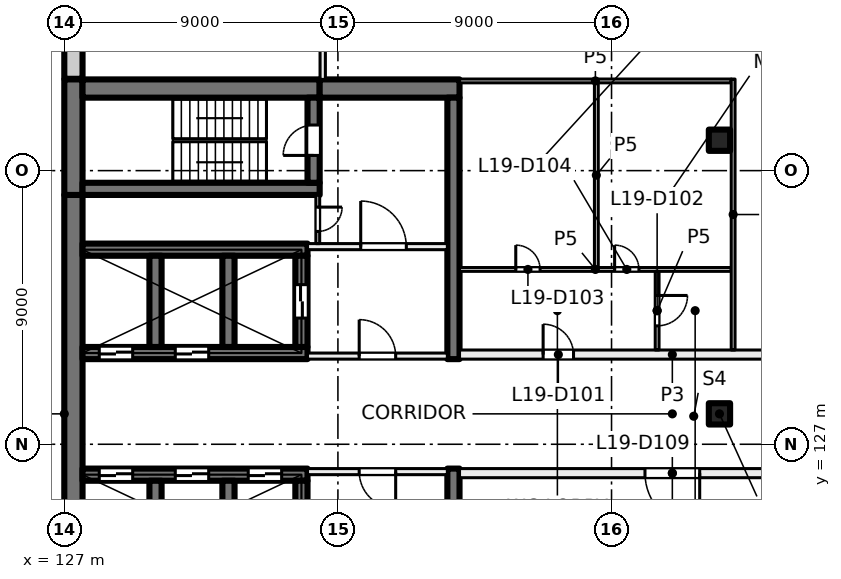
"""IFC4 building model, lengths in metres.
Left out: names, types, materials, properties, quantities, classifications, styles, units other than length and angle.
Written with IfcOpenShell. Run it as: python <this file> out.ifc"""

import sys

from ifc_helpers import new_model, si_unit, direction, frame, frame_2d, origin, origin_2d, place, context, subcontext, project, spatial, rectangle, extrude, element, fill, save


model = new_model("IFC4")
c1 = context("Model", 3, precision=1e-05, world=origin(), true_north=direction((0.0, 1.0)))
c2 = subcontext(c1, "Body", "Model", "MODEL_VIEW")
j1 = project(units=[si_unit("LENGTHUNIT", "METRE"), si_unit("PLANEANGLEUNIT", "RADIAN")], contexts=[c1])
p1 = place(None, origin())
s1 = spatial("IfcSite", under=j1, at=p1, CompositionType="ELEMENT")
p2 = place(p1, origin())
s2 = spatial("IfcBuilding", under=s1, at=p2, CompositionType="ELEMENT")
p3 = place(p2, frame((0.0, 0.0, 85.0)))
s3 = spatial("IfcBuildingStorey", under=s2, at=p3, CompositionType="ELEMENT", Elevation=85.0)
for number, where, z_axis, x_axis in (
    (1, (148.55, 128.0, 0.0), (0.0, 0.0, 1.0), (1.0, 0.0, 0.0)),
    (2, (148.55, 137.0, 0.0), (0.0, 0.0, 1.0), (1.0, 0.0, 0.0)),
):
    element("IfcColumn", number, at=place(p3, frame(where, z_axis=z_axis, x_axis=x_axis)), inside=s3, PredefinedType="COLUMN", context=c2, shape_type="SweptSolid", body=[
        extrude(rectangle(XDim=0.7, YDim=0.7, at=origin_2d()), origin(), (0.0, 0.0, 1.0), 4.0),
    ])
p4 = place(p3, frame((127.3, 120.8, 0.0), z_axis=(0.0, 0.0, 1.0), x_axis=(0.0, 1.0, 0.0)))
e3 = element("IfcWall", 3, at=p4, inside=s3, PredefinedType="SHEAR", context=c2, shape_type="SweptSolid", body=[
    extrude(rectangle(XDim=14.4, YDim=0.6, at=frame_2d((7.2, 0.0))), origin(), (0.0, 0.0, 1.0), 4.0),
])
p5 = place(p3, frame((127.3, 135.2, 0.0), z_axis=(0.0, 0.0, 1.0), x_axis=(0.0, 1.0, 0.0)))
e4 = element("IfcWall", 4, at=p5, inside=s3, PredefinedType="SHEAR", context=c2, shape_type="SweptSolid", body=[
    extrude(rectangle(XDim=3.8, YDim=0.6, at=frame_2d((1.9, 0.0))), origin(), (0.0, 0.0, 1.0), 4.0),
])
p6 = place(p3, frame((127.6, 138.7, 0.0), z_axis=(0.0, 0.0, 1.0), x_axis=(1.0, 0.0, 0.0)))
e5 = element("IfcWall", 5, at=p6, inside=s3, PredefinedType="SHEAR", context=c2, shape_type="SweptSolid", body=[
    extrude(rectangle(XDim=7.8, YDim=0.6, at=frame_2d((3.9, 0.0))), origin(), (0.0, 0.0, 1.0), 4.0),
])
p7 = place(p3, frame((135.4, 138.7, 0.0), z_axis=(0.0, 0.0, 1.0), x_axis=(1.0, 0.0, 0.0)))
e6 = element("IfcWall", 6, at=p7, inside=s3, PredefinedType="SHEAR", context=c2, shape_type="SweptSolid", body=[
    extrude(rectangle(XDim=4.6, YDim=0.6, at=frame_2d((2.3, 0.0))), origin(), (0.0, 0.0, 1.0), 4.0),
])
p8 = place(p3, frame((127.6, 135.4, 0.0), z_axis=(0.0, 0.0, 1.0), x_axis=(1.0, 0.0, 0.0)))
e7 = element("IfcWall", 7, at=p8, inside=s3, PredefinedType="SHEAR", context=c2, shape_type="SweptSolid", body=[
    extrude(rectangle(XDim=7.8, YDim=0.4, at=frame_2d((3.9, 0.0))), origin(), (0.0, 0.0, 1.0), 4.0),
])
p9 = place(p3, frame((135.2, 135.6, 0.0), z_axis=(0.0, 0.0, 1.0), x_axis=(0.0, 1.0, 0.0)))
e8 = element("IfcWall", 8, at=p9, inside=s3, PredefinedType="SHEAR", context=c2, shape_type="SweptSolid", body=[
    extrude(rectangle(XDim=2.8, YDim=0.4, at=frame_2d((1.4, 0.0))), origin(), (0.0, 0.0, 1.0), 4.0),
])
p10 = place(p9, frame((0.9, 0.0, 0.0)))
e9 = element("IfcOpeningElement", 9, at=p10, cuts=e8, PredefinedType="OPENING", context=c2, shape_type="SweptSolid", body=[
    extrude(rectangle(XDim=1.0, YDim=2.1, at=frame_2d((0.5, 1.05))), frame((0.0, 0.21, 0.0), z_axis=(0.0, -1.0, 0.0), x_axis=(1.0, 0.0, 0.0)), (0.0, 0.0, 1.0), 0.42),
])
p11 = place(p3, frame((127.6, 126.0, 0.0), z_axis=(0.0, 0.0, 1.0), x_axis=(1.0, 0.0, 0.0)))
e10 = element("IfcWall", 10, at=p11, inside=s3, PredefinedType="SHEAR", context=c2, shape_type="SweptSolid", body=[
    extrude(rectangle(XDim=7.4, YDim=0.4, at=frame_2d((3.7, 0.0))), origin(), (0.0, 0.0, 1.0), 4.0),
])
p12 = place(p11, frame((0.55, 0.0, 0.0)))
e11 = element("IfcOpeningElement", 11, at=p12, cuts=e10, PredefinedType="OPENING", context=c2, shape_type="SweptSolid", body=[
    extrude(rectangle(XDim=1.1, YDim=2.1, at=frame_2d((0.55, 1.05))), frame((0.0, 0.21, 0.0), z_axis=(0.0, -1.0, 0.0), x_axis=(1.0, 0.0, 0.0)), (0.0, 0.0, 1.0), 0.42),
])
p13 = place(p11, frame((3.05, 0.0, 0.0)))
e12 = element("IfcOpeningElement", 12, at=p13, cuts=e10, PredefinedType="OPENING", context=c2, shape_type="SweptSolid", body=[
    extrude(rectangle(XDim=1.1, YDim=2.1, at=frame_2d((0.55, 1.05))), frame((0.0, 0.21, 0.0), z_axis=(0.0, -1.0, 0.0), x_axis=(1.0, 0.0, 0.0)), (0.0, 0.0, 1.0), 0.42),
])
p14 = place(p11, frame((5.45, 0.0, 0.0)))
e13 = element("IfcOpeningElement", 13, at=p14, cuts=e10, PredefinedType="OPENING", context=c2, shape_type="SweptSolid", body=[
    extrude(rectangle(XDim=1.1, YDim=2.1, at=frame_2d((0.55, 1.05))), frame((0.0, 0.21, 0.0), z_axis=(0.0, -1.0, 0.0), x_axis=(1.0, 0.0, 0.0)), (0.0, 0.0, 1.0), 0.42),
])
for number, where, z_axis, x_axis in (
    (14, (130.0, 122.8, 0.0), (0.0, 0.0, 1.0), (0.0, 1.0, 0.0)),
    (15, (132.4, 122.8, 0.0), (0.0, 0.0, 1.0), (0.0, 1.0, 0.0)),
    (16, (134.8, 122.8, 0.0), (0.0, 0.0, 1.0), (0.0, 1.0, 0.0)),
):
    element("IfcWall", number, at=place(p3, frame(where, z_axis=z_axis, x_axis=x_axis)), inside=s3, PredefinedType="SHEAR", context=c2, shape_type="SweptSolid", body=[
        extrude(rectangle(XDim=3.0, YDim=0.4, at=frame_2d((1.5, 0.0))), origin(), (0.0, 0.0, 1.0), 4.0),
    ])
p15 = place(p3, frame((127.6, 130.0, 0.0), z_axis=(0.0, 0.0, 1.0), x_axis=(1.0, 0.0, 0.0)))
e17 = element("IfcWall", 17, at=p15, inside=s3, PredefinedType="SHEAR", context=c2, shape_type="SweptSolid", body=[
    extrude(rectangle(XDim=7.4, YDim=0.4, at=frame_2d((3.7, 0.0))), origin(), (0.0, 0.0, 1.0), 4.0),
])
p16 = place(p15, frame((0.55, 0.0, 0.0)))
e18 = element("IfcOpeningElement", 18, at=p16, cuts=e17, PredefinedType="OPENING", context=c2, shape_type="SweptSolid", body=[
    extrude(rectangle(XDim=1.1, YDim=2.1, at=frame_2d((0.55, 1.05))), frame((0.0, 0.21, 0.0), z_axis=(0.0, -1.0, 0.0), x_axis=(1.0, 0.0, 0.0)), (0.0, 0.0, 1.0), 0.42),
])
p17 = place(p15, frame((3.05, 0.0, 0.0)))
e19 = element("IfcOpeningElement", 19, at=p17, cuts=e17, PredefinedType="OPENING", context=c2, shape_type="SweptSolid", body=[
    extrude(rectangle(XDim=1.1, YDim=2.1, at=frame_2d((0.55, 1.05))), frame((0.0, 0.21, 0.0), z_axis=(0.0, -1.0, 0.0), x_axis=(1.0, 0.0, 0.0)), (0.0, 0.0, 1.0), 0.42),
])
p18 = place(p3, frame((127.6, 133.4, 0.0), z_axis=(0.0, 0.0, 1.0), x_axis=(1.0, 0.0, 0.0)))
e20 = element("IfcWall", 20, at=p18, inside=s3, PredefinedType="SHEAR", context=c2, shape_type="SweptSolid", body=[
    extrude(rectangle(XDim=7.4, YDim=0.4, at=frame_2d((3.7, 0.0))), origin(), (0.0, 0.0, 1.0), 4.0),
])
for number, where, z_axis, x_axis in (
    (21, (130.0, 130.2, 0.0), (0.0, 0.0, 1.0), (0.0, 1.0, 0.0)),
    (22, (132.4, 130.2, 0.0), (0.0, 0.0, 1.0), (0.0, 1.0, 0.0)),
):
    element("IfcWall", number, at=place(p3, frame(where, z_axis=z_axis, x_axis=x_axis)), inside=s3, PredefinedType="SHEAR", context=c2, shape_type="SweptSolid", body=[
        extrude(rectangle(XDim=3.0, YDim=0.4, at=frame_2d((1.5, 0.0))), origin(), (0.0, 0.0, 1.0), 4.0),
    ])
p19 = place(p3, frame((134.8, 130.2, 0.0), z_axis=(0.0, 0.0, 1.0), x_axis=(0.0, 1.0, 0.0)))
e23 = element("IfcWall", 23, at=p19, inside=s3, PredefinedType="SHEAR", context=c2, shape_type="SweptSolid", body=[
    extrude(rectangle(XDim=3.0, YDim=0.4, at=frame_2d((1.5, 0.0))), origin(), (0.0, 0.0, 1.0), 4.0),
])
p20 = place(p19, frame((0.95, 0.0, 0.0)))
e24 = element("IfcOpeningElement", 24, at=p20, cuts=e23, PredefinedType="OPENING", context=c2, shape_type="SweptSolid", body=[
    extrude(rectangle(XDim=1.1, YDim=2.1, at=frame_2d((0.55, 1.05))), frame((0.0, 0.21, 0.0), z_axis=(0.0, -1.0, 0.0), x_axis=(1.0, 0.0, 0.0)), (0.0, 0.0, 1.0), 0.42),
])
for number, where, z_axis, x_axis in (
    (25, (139.8, 117.6, 0.0), (0.0, 0.0, 1.0), (0.0, 1.0, 0.0)),
    (26, (139.8, 129.8, 0.0), (0.0, 0.0, 1.0), (0.0, 1.0, 0.0)),
):
    element("IfcWall", number, at=place(p3, frame(where, z_axis=z_axis, x_axis=x_axis)), inside=s3, PredefinedType="SHEAR", context=c2, shape_type="SweptSolid", body=[
        extrude(rectangle(XDim=8.6, YDim=0.4, at=frame_2d((4.3, 0.0))), origin(), (0.0, 0.0, 1.0), 4.0),
    ])
p21 = place(p3, frame((127.3, 139.02, 0.0), z_axis=(0.0, 0.0, 1.0), x_axis=(0.0, 1.0, 0.0)))
e27 = element("IfcWall", 27, at=p21, inside=s3, PredefinedType="SOLIDWALL", context=c2, shape_type="SweptSolid", body=[
    extrude(rectangle(XDim=2.98, YDim=0.6, at=frame_2d((1.49, 0.0))), origin(), (0.0, 0.0, 1.0), 3.625),
])
p22 = place(p3, frame((135.0, 129.9, 0.0), z_axis=(0.0, 0.0, 1.0), x_axis=(1.0, 0.0, 0.0)))
e28 = element("IfcWall", 28, at=p22, inside=s3, PredefinedType="PARTITIONING", context=c2, shape_type="SweptSolid", body=[
    extrude(rectangle(XDim=4.6, YDim=0.2, at=frame_2d((2.3, 0.0))), origin(), (0.0, 0.0, 1.0), 3.625),
])
p23 = place(p22, frame((1.7, 0.0, 0.0)))
e29 = element("IfcOpeningElement", 29, at=p23, cuts=e28, PredefinedType="OPENING", context=c2, shape_type="SweptSolid", body=[
    extrude(rectangle(XDim=1.2, YDim=2.1, at=frame_2d((0.6, 1.05))), frame((0.0, 0.11, 0.0), z_axis=(0.0, -1.0, 0.0), x_axis=(1.0, 0.0, 0.0)), (0.0, 0.0, 1.0), 0.22),
])
p24 = place(p3, frame((135.0, 133.5, 0.0), z_axis=(0.0, 0.0, 1.0), x_axis=(1.0, 0.0, 0.0)))
e30 = element("IfcWall", 30, at=p24, inside=s3, PredefinedType="PARTITIONING", context=c2, shape_type="SweptSolid", body=[
    extrude(rectangle(XDim=4.6, YDim=0.2, at=frame_2d((2.3, 0.0))), origin(), (0.0, 0.0, 1.0), 3.625),
])
p25 = place(p24, frame((1.75, 0.0, 0.0)))
e31 = element("IfcOpeningElement", 31, at=p25, cuts=e30, PredefinedType="OPENING", context=c2, shape_type="SweptSolid", body=[
    extrude(rectangle(XDim=1.5, YDim=2.1, at=frame_2d((0.75, 1.05))), frame((0.0, 0.11, 0.0), z_axis=(0.0, -1.0, 0.0), x_axis=(1.0, 0.0, 0.0)), (0.0, 0.0, 1.0), 0.22),
])
p26 = place(p3, frame((135.337, 135.2, 0.0), z_axis=(0.0, 0.0, 1.0), x_axis=(0.0, -1.0, 0.0)))
e32 = element("IfcWall", 32, at=p26, inside=s3, PredefinedType="PARTITIONING", context=c2, shape_type="SweptSolid", body=[
    extrude(rectangle(XDim=1.6, YDim=0.125, at=frame_2d((0.8, 0.0))), origin(), (0.0, 0.0, 1.0), 3.625),
])
p27 = place(p26, frame((0.4, 0.0, 0.0)))
e33 = element("IfcOpeningElement", 33, at=p27, cuts=e32, PredefinedType="OPENING", context=c2, shape_type="SweptSolid", body=[
    extrude(rectangle(XDim=0.8, YDim=2.1, at=frame_2d((0.4, 1.05))), frame((0.0, 0.073, 0.0), z_axis=(0.0, -1.0, 0.0), x_axis=(1.0, 0.0, 0.0)), (0.0, 0.0, 1.0), 0.145),
])
p28 = place(p3, frame((139.6, 126.1, 0.0), z_axis=(0.0, 0.0, 1.0), x_axis=(-1.0, 0.0, 0.0)))
e34 = element("IfcWall", 34, at=p28, inside=s3, PredefinedType="PARTITIONING", context=c2, shape_type="SweptSolid", body=[
    extrude(rectangle(XDim=4.6, YDim=0.2, at=frame_2d((2.3, 0.0))), origin(), (0.0, 0.0, 1.0), 3.625),
])
p29 = place(p28, frame((1.7, 0.0, 0.0)))
e35 = element("IfcOpeningElement", 35, at=p29, cuts=e34, PredefinedType="OPENING", context=c2, shape_type="SweptSolid", body=[
    extrude(rectangle(XDim=1.2, YDim=2.1, at=frame_2d((0.6, 1.05))), frame((0.0, 0.11, 0.0), z_axis=(0.0, -1.0, 0.0), x_axis=(1.0, 0.0, 0.0)), (0.0, 0.0, 1.0), 0.22),
])
p30 = place(p3, frame((135.5, 145.4, 0.0), z_axis=(0.0, 0.0, 1.0), x_axis=(0.0, -1.0, 0.0)))
e36 = element("IfcWall", 36, at=p30, inside=s3, PredefinedType="PARTITIONING", context=c2, shape_type="SweptSolid", body=[
    extrude(rectangle(XDim=6.4, YDim=0.175, at=frame_2d((3.2, 0.0))), origin(), (0.0, 0.0, 1.0), 3.625),
])
p31 = place(p30, frame((2.6, 0.0, 0.0)))
e37 = element("IfcOpeningElement", 37, at=p31, cuts=e36, PredefinedType="OPENING", context=c2, shape_type="SweptSolid", body=[
    extrude(rectangle(XDim=1.2, YDim=2.1, at=frame_2d((0.6, 1.05))), frame((0.0, 0.097, 0.0), z_axis=(0.0, -1.0, 0.0), x_axis=(1.0, 0.0, 0.0)), (0.0, 0.0, 1.0), 0.195),
])
p32 = place(p3, frame((140.0, 129.95, 0.0), z_axis=(0.0, 0.0, 1.0), x_axis=(1.0, 0.0, 0.0)))
e38 = element("IfcWall", 38, at=p32, inside=s3, PredefinedType="PARTITIONING", context=c2, shape_type="SweptSolid", body=[
    extrude(rectangle(XDim=14.0, YDim=0.3, at=frame_2d((7.0, 0.0))), origin(), (0.0, 0.0, 1.0), 3.625),
])
p33 = place(p32, frame((2.75, 0.0, 0.0)))
e39 = element("IfcOpeningElement", 39, at=p33, cuts=e38, PredefinedType="OPENING", context=c2, shape_type="SweptSolid", body=[
    extrude(rectangle(XDim=1.0, YDim=2.1, at=frame_2d((0.5, 1.05))), frame((0.0, 0.16, 0.0), z_axis=(0.0, -1.0, 0.0), x_axis=(1.0, 0.0, 0.0)), (0.0, 0.0, 1.0), 0.32),
])
p34 = place(p32, frame((10.6, 0.0, 0.0)))
e40 = element("IfcOpeningElement", 40, at=p34, cuts=e38, PredefinedType="OPENING", context=c2, shape_type="SweptSolid", body=[
    extrude(rectangle(XDim=1.8, YDim=2.1, at=frame_2d((0.9, 1.05))), frame((0.0, 0.16, 0.0), z_axis=(0.0, -1.0, 0.0), x_axis=(1.0, 0.0, 0.0)), (0.0, 0.0, 1.0), 0.32),
])
p35 = place(p3, frame((140.0, 132.75, 0.0), z_axis=(0.0, 0.0, 1.0), x_axis=(1.0, 0.0, 0.0)))
e41 = element("IfcWall", 41, at=p35, inside=s3, PredefinedType="PARTITIONING", context=c2, shape_type="SweptSolid", body=[
    extrude(rectangle(XDim=8.938, YDim=0.125, at=frame_2d((4.469, 0.0))), origin(), (0.0, 0.0, 1.0), 3.625),
])
p36 = place(p35, frame((1.85, 0.0, 0.0)))
e42 = element("IfcOpeningElement", 42, at=p36, cuts=e41, PredefinedType="OPENING", context=c2, shape_type="SweptSolid", body=[
    extrude(rectangle(XDim=0.8, YDim=2.1, at=frame_2d((0.4, 1.05))), frame((0.0, 0.073, 0.0), z_axis=(0.0, -1.0, 0.0), x_axis=(1.0, 0.0, 0.0)), (0.0, 0.0, 1.0), 0.145),
])
p37 = place(p35, frame((5.102, 0.0, 0.0)))
e43 = element("IfcOpeningElement", 43, at=p37, cuts=e41, PredefinedType="OPENING", context=c2, shape_type="SweptSolid", body=[
    extrude(rectangle(XDim=0.8, YDim=2.1, at=frame_2d((0.4, 1.05))), frame((0.0, 0.073, 0.0), z_axis=(0.0, -1.0, 0.0), x_axis=(1.0, 0.0, 0.0)), (0.0, 0.0, 1.0), 0.145),
])
p38 = place(p3, frame((140.0, 138.95, 0.0), z_axis=(0.0, 0.0, 1.0), x_axis=(1.0, 0.0, 0.0)))
e44 = element("IfcWall", 44, at=p38, inside=s3, PredefinedType="PARTITIONING", context=c2, shape_type="SweptSolid", body=[
    extrude(rectangle(XDim=8.938, YDim=0.125, at=frame_2d((4.469, 0.0))), origin(), (0.0, 0.0, 1.0), 3.625),
])
p39 = place(p3, frame((144.5, 132.812, 0.0), z_axis=(0.0, 0.0, 1.0), x_axis=(0.0, 1.0, 0.0)))
e45 = element("IfcWall", 45, at=p39, inside=s3, PredefinedType="PARTITIONING", context=c2, shape_type="SweptSolid", body=[
    extrude(rectangle(XDim=6.076, YDim=0.125, at=frame_2d((3.038, 0.0))), origin(), (0.0, 0.0, 1.0), 3.625),
])
p40 = place(p3, frame((146.5, 132.688, 0.0), z_axis=(0.0, 0.0, 1.0), x_axis=(0.0, -1.0, 0.0)))
e46 = element("IfcWall", 46, at=p40, inside=s3, PredefinedType="PARTITIONING", context=c2, shape_type="SweptSolid", body=[
    extrude(rectangle(XDim=2.588, YDim=0.125, at=frame_2d((1.294, 0.0))), origin(), (0.0, 0.0, 1.0), 3.625),
])
p41 = place(p40, frame((0.794, 0.0, 0.0)))
e47 = element("IfcOpeningElement", 47, at=p41, cuts=e46, PredefinedType="OPENING", context=c2, shape_type="SweptSolid", body=[
    extrude(rectangle(XDim=1.0, YDim=2.1, at=frame_2d((0.5, 1.05))), frame((0.0, 0.073, 0.0), z_axis=(0.0, -1.0, 0.0), x_axis=(1.0, 0.0, 0.0)), (0.0, 0.0, 1.0), 0.145),
])
p42 = place(p3, frame((149.0, 139.012, 0.0), z_axis=(0.0, 0.0, 1.0), x_axis=(0.0, -1.0, 0.0)))
e48 = element("IfcWall", 48, at=p42, inside=s3, PredefinedType="PARTITIONING", context=c2, shape_type="SweptSolid", body=[
    extrude(rectangle(XDim=8.912, YDim=0.125, at=frame_2d((4.456, 0.0))), origin(), (0.0, 0.0, 1.0), 3.625),
])
p43 = place(p3, frame((154.0, 126.05, 0.0), z_axis=(0.0, 0.0, 1.0), x_axis=(-1.0, 0.0, 0.0)))
e49 = element("IfcWall", 49, at=p43, inside=s3, PredefinedType="PARTITIONING", context=c2, shape_type="SweptSolid", body=[
    extrude(rectangle(XDim=14.0, YDim=0.3, at=frame_2d((7.0, 0.0))), origin(), (0.0, 0.0, 1.0), 3.625),
])
p44 = place(p43, frame((6.1, 0.0, 0.0)))
e50 = element("IfcOpeningElement", 50, at=p44, cuts=e49, PredefinedType="OPENING", context=c2, shape_type="SweptSolid", body=[
    extrude(rectangle(XDim=1.8, YDim=2.1, at=frame_2d((0.9, 1.05))), frame((0.0, 0.16, 0.0), z_axis=(0.0, -1.0, 0.0), x_axis=(1.0, 0.0, 0.0)), (0.0, 0.0, 1.0), 0.32),
])
p45 = place(p16, origin())
e51 = element("IfcDoor", 51, at=p45, inside=s3, OperationType="DOUBLE_DOOR_SLIDING", PredefinedType="DOOR", context=c2, shape_type="SweptSolid", body=[
    extrude(rectangle(XDim=1.1, YDim=2.1, at=frame_2d((0.55, 1.05))), frame((0.0, 0.025, 0.0), z_axis=(0.0, -1.0, 0.0), x_axis=(1.0, 0.0, 0.0)), (0.0, 0.0, 1.0), 0.05),
])
fill(e18, e51)
p46 = place(p17, origin())
e52 = element("IfcDoor", 52, at=p46, inside=s3, OperationType="DOUBLE_DOOR_SLIDING", PredefinedType="DOOR", context=c2, shape_type="SweptSolid", body=[
    extrude(rectangle(XDim=1.1, YDim=2.1, at=frame_2d((0.55, 1.05))), frame((0.0, 0.025, 0.0), z_axis=(0.0, -1.0, 0.0), x_axis=(1.0, 0.0, 0.0)), (0.0, 0.0, 1.0), 0.05),
])
fill(e19, e52)
p47 = place(p12, origin())
e53 = element("IfcDoor", 53, at=p47, inside=s3, OperationType="DOUBLE_DOOR_SLIDING", PredefinedType="DOOR", context=c2, shape_type="SweptSolid", body=[
    extrude(rectangle(XDim=1.1, YDim=2.1, at=frame_2d((0.55, 1.05))), frame((0.0, 0.025, 0.0), z_axis=(0.0, -1.0, 0.0), x_axis=(1.0, 0.0, 0.0)), (0.0, 0.0, 1.0), 0.05),
])
fill(e11, e53)
p48 = place(p13, origin())
e54 = element("IfcDoor", 54, at=p48, inside=s3, OperationType="DOUBLE_DOOR_SLIDING", PredefinedType="DOOR", context=c2, shape_type="SweptSolid", body=[
    extrude(rectangle(XDim=1.1, YDim=2.1, at=frame_2d((0.55, 1.05))), frame((0.0, 0.025, 0.0), z_axis=(0.0, -1.0, 0.0), x_axis=(1.0, 0.0, 0.0)), (0.0, 0.0, 1.0), 0.05),
])
fill(e12, e54)
p49 = place(p14, origin())
e55 = element("IfcDoor", 55, at=p49, inside=s3, OperationType="DOUBLE_DOOR_SLIDING", PredefinedType="DOOR", context=c2, shape_type="SweptSolid", body=[
    extrude(rectangle(XDim=1.1, YDim=2.1, at=frame_2d((0.55, 1.05))), frame((0.0, 0.025, 0.0), z_axis=(0.0, -1.0, 0.0), x_axis=(1.0, 0.0, 0.0)), (0.0, 0.0, 1.0), 0.05),
])
fill(e13, e55)
p50 = place(p23, origin())
e56 = element("IfcDoor", 56, at=p50, inside=s3, OperationType="DOUBLE_DOOR_SINGLE_SWING", PredefinedType="DOOR", context=c2, shape_type="SweptSolid", body=[
    extrude(rectangle(XDim=1.2, YDim=2.1, at=frame_2d((0.6, 1.05))), frame((0.0, 0.025, 0.0), z_axis=(0.0, -1.0, 0.0), x_axis=(1.0, 0.0, 0.0)), (0.0, 0.0, 1.0), 0.05),
])
fill(e29, e56)
p51 = place(p25, origin())
e57 = element("IfcDoor", 57, at=p51, inside=s3, OperationType="DOUBLE_DOOR_SINGLE_SWING", PredefinedType="DOOR", context=c2, shape_type="SweptSolid", body=[
    extrude(rectangle(XDim=1.5, YDim=2.1, at=frame_2d((0.75, 1.05))), frame((0.0, 0.025, 0.0), z_axis=(0.0, -1.0, 0.0), x_axis=(1.0, 0.0, 0.0)), (0.0, 0.0, 1.0), 0.05),
])
fill(e31, e57)
p52 = place(p10, origin())
e58 = element("IfcDoor", 58, at=p52, inside=s3, OperationType="SINGLE_SWING_LEFT", PredefinedType="DOOR", context=c2, shape_type="SweptSolid", body=[
    extrude(rectangle(XDim=1.0, YDim=2.1, at=frame_2d((0.5, 1.05))), frame((0.0, 0.025, 0.0), z_axis=(0.0, -1.0, 0.0), x_axis=(1.0, 0.0, 0.0)), (0.0, 0.0, 1.0), 0.05),
])
fill(e9, e58)
p53 = place(p27, origin())
e59 = element("IfcDoor", 59, at=p53, inside=s3, OperationType="SINGLE_SWING_RIGHT", PredefinedType="DOOR", context=c2, shape_type="SweptSolid", body=[
    extrude(rectangle(XDim=0.8, YDim=2.1, at=frame_2d((0.4, 1.05))), frame((0.0, 0.025, 0.0), z_axis=(0.0, -1.0, 0.0), x_axis=(1.0, 0.0, 0.0)), (0.0, 0.0, 1.0), 0.05),
])
fill(e33, e59)
p54 = place(p29, origin())
e60 = element("IfcDoor", 60, at=p54, inside=s3, OperationType="DOUBLE_DOOR_SINGLE_SWING", PredefinedType="DOOR", context=c2, shape_type="SweptSolid", body=[
    extrude(rectangle(XDim=1.2, YDim=2.1, at=frame_2d((0.6, 1.05))), frame((0.0, 0.025, 0.0), z_axis=(0.0, -1.0, 0.0), x_axis=(1.0, 0.0, 0.0)), (0.0, 0.0, 1.0), 0.05),
])
fill(e35, e60)
p55 = place(p20, origin())
e61 = element("IfcDoor", 61, at=p55, inside=s3, OperationType="DOUBLE_DOOR_SLIDING", PredefinedType="DOOR", context=c2, shape_type="SweptSolid", body=[
    extrude(rectangle(XDim=1.1, YDim=2.1, at=frame_2d((0.55, 1.05))), frame((0.0, 0.025, 0.0), z_axis=(0.0, -1.0, 0.0), x_axis=(1.0, 0.0, 0.0)), (0.0, 0.0, 1.0), 0.05),
])
fill(e24, e61)
p56 = place(p33, origin())
e62 = element("IfcDoor", 62, at=p56, inside=s3, OperationType="SINGLE_SWING_LEFT", PredefinedType="DOOR", context=c2, shape_type="SweptSolid", body=[
    extrude(rectangle(XDim=1.0, YDim=2.1, at=frame_2d((0.5, 1.05))), frame((0.0, 0.025, 0.0), z_axis=(0.0, -1.0, 0.0), x_axis=(1.0, 0.0, 0.0)), (0.0, 0.0, 1.0), 0.05),
])
fill(e39, e62)
p57 = place(p41, origin())
e63 = element("IfcDoor", 63, at=p57, inside=s3, OperationType="SINGLE_SWING_RIGHT", PredefinedType="DOOR", context=c2, shape_type="SweptSolid", body=[
    extrude(rectangle(XDim=1.0, YDim=2.1, at=frame_2d((0.5, 1.05))), frame((0.0, 0.025, 0.0), z_axis=(0.0, -1.0, 0.0), x_axis=(1.0, 0.0, 0.0)), (0.0, 0.0, 1.0), 0.05),
])
fill(e47, e63)
p58 = place(p36, origin())
e64 = element("IfcDoor", 64, at=p58, inside=s3, OperationType="SINGLE_SWING_LEFT", PredefinedType="DOOR", context=c2, shape_type="SweptSolid", body=[
    extrude(rectangle(XDim=0.8, YDim=2.1, at=frame_2d((0.4, 1.05))), frame((0.0, 0.025, 0.0), z_axis=(0.0, -1.0, 0.0), x_axis=(1.0, 0.0, 0.0)), (0.0, 0.0, 1.0), 0.05),
])
fill(e42, e64)
p59 = place(p37, origin())
e65 = element("IfcDoor", 65, at=p59, inside=s3, OperationType="SINGLE_SWING_LEFT", PredefinedType="DOOR", context=c2, shape_type="SweptSolid", body=[
    extrude(rectangle(XDim=0.8, YDim=2.1, at=frame_2d((0.4, 1.05))), frame((0.0, 0.025, 0.0), z_axis=(0.0, -1.0, 0.0), x_axis=(1.0, 0.0, 0.0)), (0.0, 0.0, 1.0), 0.05),
])
fill(e43, e65)
p60 = place(p44, origin())
e66 = element("IfcDoor", 66, at=p60, inside=s3, OperationType="DOUBLE_DOOR_SINGLE_SWING", PredefinedType="DOOR", context=c2, shape_type="SweptSolid", body=[
    extrude(rectangle(XDim=1.8, YDim=2.1, at=frame_2d((0.9, 1.05))), frame((0.0, 0.025, 0.0), z_axis=(0.0, -1.0, 0.0), x_axis=(1.0, 0.0, 0.0)), (0.0, 0.0, 1.0), 0.05),
])
fill(e50, e66)
save(model, sys.argv[1])
